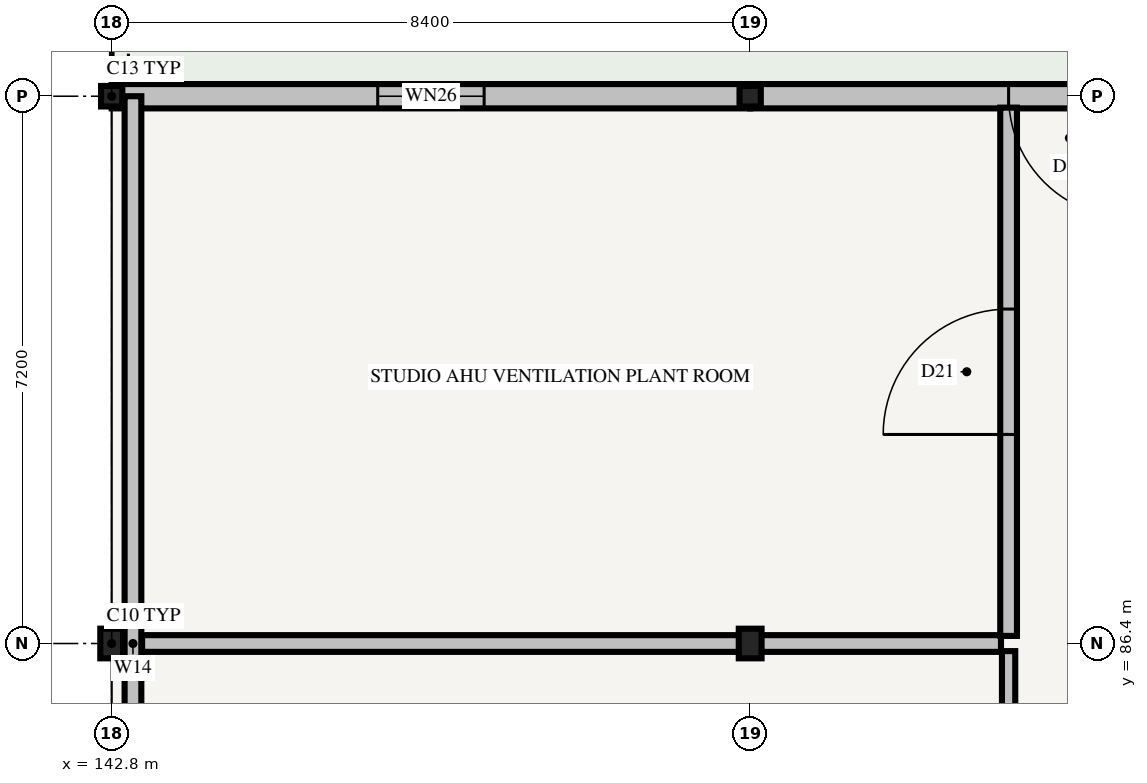
"""IFC4 building model, lengths in metres.
Left out: names, types, materials, properties, quantities, classifications, styles, units other than length and angle.
Written with IfcOpenShell. Run it as: python <this file> out.ifc"""

import sys

from ifc_helpers import new_model, si_unit, direction, frame, frame_2d, origin, origin_2d, place, context, subcontext, project, spatial, rectangle, i_section, extrude, element, fill, save


model = new_model("IFC4")
c1 = context("Model", 3, precision=1e-05, world=origin(), true_north=direction((0.0, 1.0)))
c2 = subcontext(c1, "Body", "Model", "MODEL_VIEW")
j1 = project(units=[si_unit("LENGTHUNIT", "METRE"), si_unit("PLANEANGLEUNIT", "RADIAN")], contexts=[c1])
p1 = place(None, origin())
s1 = spatial("IfcSite", under=j1, at=p1, CompositionType="ELEMENT")
p2 = place(p1, origin())
s2 = spatial("IfcBuilding", under=s1, at=p2, CompositionType="ELEMENT")
p3 = place(p2, frame((0.0, 0.0, 8.7)))
s3 = spatial("IfcBuildingStorey", under=s2, at=p3, CompositionType="ELEMENT", Elevation=8.7)
p4 = place(p3, frame((142.8, 86.4, 0.0), z_axis=(0.0, 0.0, 1.0), x_axis=(1.0, 0.0, 0.0)))
e1 = element("IfcColumn", 1, at=p4, inside=s3, PredefinedType="COLUMN", context=c2, shape_type="SweptSolid", body=[
    extrude(i_section(OverallWidth=0.3, OverallDepth=0.39, WebThickness=0.011, FlangeThickness=0.019, FilletRadius=0.027, at=origin_2d()), origin(), (0.0, 0.0, 1.0), 4.2),
])
p5 = place(p3, frame((142.8, 93.6, 0.0), z_axis=(0.0, 0.0, 1.0), x_axis=(1.0, 0.0, 0.0)))
e2 = element("IfcColumn", 2, at=p5, inside=s3, PredefinedType="COLUMN", context=c2, shape_type="SweptSolid", body=[
    extrude(i_section(OverallWidth=0.28, OverallDepth=0.27, WebThickness=0.008, FlangeThickness=0.013, FilletRadius=0.024, at=origin_2d()), origin(), (0.0, 0.0, 1.0), 4.2),
])
p6 = place(p3, frame((151.2, 86.4, 0.0), z_axis=(0.0, 0.0, 1.0), x_axis=(1.0, 0.0, 0.0)))
e3 = element("IfcColumn", 3, at=p6, inside=s3, PredefinedType="COLUMN", context=c2, shape_type="SweptSolid", body=[
    extrude(i_section(OverallWidth=0.3, OverallDepth=0.39, WebThickness=0.011, FlangeThickness=0.019, FilletRadius=0.027, at=origin_2d()), origin(), (0.0, 0.0, 1.0), 4.2),
])
p7 = place(p3, frame((151.2, 93.6, 0.0), z_axis=(0.0, 0.0, 1.0), x_axis=(1.0, 0.0, 0.0)))
e4 = element("IfcColumn", 4, at=p7, inside=s3, PredefinedType="COLUMN", context=c2, shape_type="SweptSolid", body=[
    extrude(i_section(OverallWidth=0.28, OverallDepth=0.27, WebThickness=0.008, FlangeThickness=0.013, FilletRadius=0.024, at=origin_2d()), origin(), (0.0, 0.0, 1.0), 4.2),
])
p8 = place(p3, frame((159.6, 93.6, 0.0), z_axis=(0.0, 0.0, 1.0), x_axis=(-1.0, 0.0, 0.0)))
e5 = element("IfcWall", 5, at=p8, inside=s3, PredefinedType="STANDARD", context=c2, shape_type="SweptSolid", body=[
    extrude(rectangle(XDim=8.4, YDim=0.32, at=frame_2d((4.2, 0.0))), origin(), (0.0, 0.0, 1.0), 3.355),
])
p9 = place(p8, frame((3.4, 0.0, 0.0)))
e6 = element("IfcOpeningElement", 6, at=p9, cuts=e5, PredefinedType="OPENING", context=c2, shape_type="SweptSolid", body=[
    extrude(rectangle(XDim=1.6, YDim=2.3, at=frame_2d((0.8, 1.15))), frame((0.0, 0.185, 0.0), z_axis=(0.0, -1.0, 0.0), x_axis=(1.0, 0.0, 0.0)), (0.0, 0.0, 1.0), 0.37),
])
p10 = place(p3, frame((151.2, 93.6, 0.0), z_axis=(0.0, 0.0, 1.0), x_axis=(-1.0, 0.0, 0.0)))
e7 = element("IfcWall", 7, at=p10, inside=s3, PredefinedType="STANDARD", context=c2, shape_type="SweptSolid", body=[
    extrude(rectangle(XDim=8.4, YDim=0.32, at=frame_2d((4.2, 0.0))), origin(), (0.0, 0.0, 1.0), 3.355),
])
p11 = place(p10, frame((3.5, 0.0, 0.85)))
e8 = element("IfcOpeningElement", 8, at=p11, cuts=e7, PredefinedType="OPENING", context=c2, shape_type="SweptSolid", body=[
    extrude(rectangle(XDim=1.4, YDim=1.2, at=frame_2d((0.7, 0.6))), frame((0.0, 0.185, 0.0), z_axis=(0.0, -1.0, 0.0), x_axis=(1.0, 0.0, 0.0)), (0.0, 0.0, 1.0), 0.37),
])
p12 = place(p3, frame((143.08, 79.2, 0.0), z_axis=(0.0, 0.0, 1.0), x_axis=(0.0, 1.0, 0.0)))
e9 = element("IfcWall", 9, at=p12, inside=s3, PredefinedType="PARTITIONING", context=c2, shape_type="SweptSolid", body=[
    extrude(rectangle(XDim=14.4, YDim=0.22, at=frame_2d((7.2, 0.0))), origin(), (0.0, 0.0, 1.0), 3.32),
])
p13 = place(p3, frame((154.6, 64.9, 0.0), z_axis=(0.0, 0.0, 1.0), x_axis=(0.0, 1.0, 0.0)))
e10 = element("IfcWall", 10, at=p13, inside=s3, PredefinedType="PARTITIONING", context=c2, shape_type="SweptSolid", body=[
    extrude(rectangle(XDim=21.4, YDim=0.175, at=frame_2d((10.7, 0.0))), origin(), (0.0, 0.0, 1.0), 3.32),
])
p14 = place(p13, frame((10.025, 0.0, 0.0)))
e11 = element("IfcOpeningElement", 11, at=p14, cuts=e10, PredefinedType="OPENING", context=c2, shape_type="SweptSolid", body=[
    extrude(rectangle(XDim=1.35, YDim=2.2, at=frame_2d((0.675, 1.1))), frame((0.0, 0.112, 0.0), z_axis=(0.0, -1.0, 0.0), x_axis=(1.0, 0.0, 0.0)), (0.0, 0.0, 1.0), 0.225),
])
p15 = place(p3, frame((143.2, 86.4, 0.0), z_axis=(0.0, 0.0, 1.0), x_axis=(1.0, 0.0, 0.0)))
e12 = element("IfcWall", 12, at=p15, inside=s3, PredefinedType="PARTITIONING", context=c2, shape_type="SweptSolid", body=[
    extrude(rectangle(XDim=11.3, YDim=0.22, at=frame_2d((5.65, 0.0))), origin(), (0.0, 0.0, 1.0), 3.32),
])
p16 = place(p3, frame((154.6, 86.5, 0.0), z_axis=(0.0, 0.0, 1.0), x_axis=(0.0, 1.0, 0.0)))
e13 = element("IfcWall", 13, at=p16, inside=s3, PredefinedType="PARTITIONING", context=c2, shape_type="SweptSolid", body=[
    extrude(rectangle(XDim=6.95, YDim=0.22, at=frame_2d((3.475, 0.0))), origin(), (0.0, 0.0, 1.0), 3.32),
])
p17 = place(p16, frame((2.65, 0.0, 0.0)))
e14 = element("IfcOpeningElement", 14, at=p17, cuts=e13, PredefinedType="OPENING", context=c2, shape_type="SweptSolid", body=[
    extrude(rectangle(XDim=1.65, YDim=2.3, at=frame_2d((0.825, 1.15))), frame((0.0, 0.135, 0.0), z_axis=(0.0, -1.0, 0.0), x_axis=(1.0, 0.0, 0.0)), (0.0, 0.0, 1.0), 0.27),
])
p18 = place(p9, frame((1.6, 0.0, 0.0), z_axis=(0.0, 0.0, 1.0), x_axis=(-1.0, 0.0, 0.0)))
e15 = element("IfcDoor", 15, at=p18, inside=s3, OperationType="DOUBLE_DOOR_SINGLE_SWING", PredefinedType="DOOR", context=c2, shape_type="SweptSolid", body=[
    extrude(rectangle(XDim=1.6, YDim=2.3, at=frame_2d((0.8, 1.15))), frame((0.0, 0.025, 0.0), z_axis=(0.0, -1.0, 0.0), x_axis=(1.0, 0.0, 0.0)), (0.0, 0.0, 1.0), 0.05),
])
fill(e6, e15)
p19 = place(p11, origin())
e16 = element("IfcWindow", 16, at=p19, inside=s3, PartitioningType="SINGLE_PANEL", PredefinedType="WINDOW", context=c2, shape_type="SweptSolid", body=[
    extrude(rectangle(XDim=1.4, YDim=1.2, at=frame_2d((0.7, 0.6))), frame((0.0, 0.03, 0.0), z_axis=(0.0, -1.0, 0.0), x_axis=(1.0, 0.0, 0.0)), (0.0, 0.0, 1.0), 0.06),
])
fill(e8, e16)
p20 = place(p17, frame((1.65, 0.0, 0.0), z_axis=(0.0, 0.0, 1.0), x_axis=(-1.0, 0.0, 0.0)))
e17 = element("IfcDoor", 17, at=p20, inside=s3, OperationType="DOUBLE_DOOR_SINGLE_SWING", PredefinedType="DOOR", context=c2, shape_type="SweptSolid", body=[
    extrude(rectangle(XDim=1.65, YDim=2.3, at=frame_2d((0.825, 1.15))), frame((0.0, 0.025, 0.0), z_axis=(0.0, -1.0, 0.0), x_axis=(1.0, 0.0, 0.0)), (0.0, 0.0, 1.0), 0.05),
])
fill(e14, e17)
save(model, sys.argv[1])
